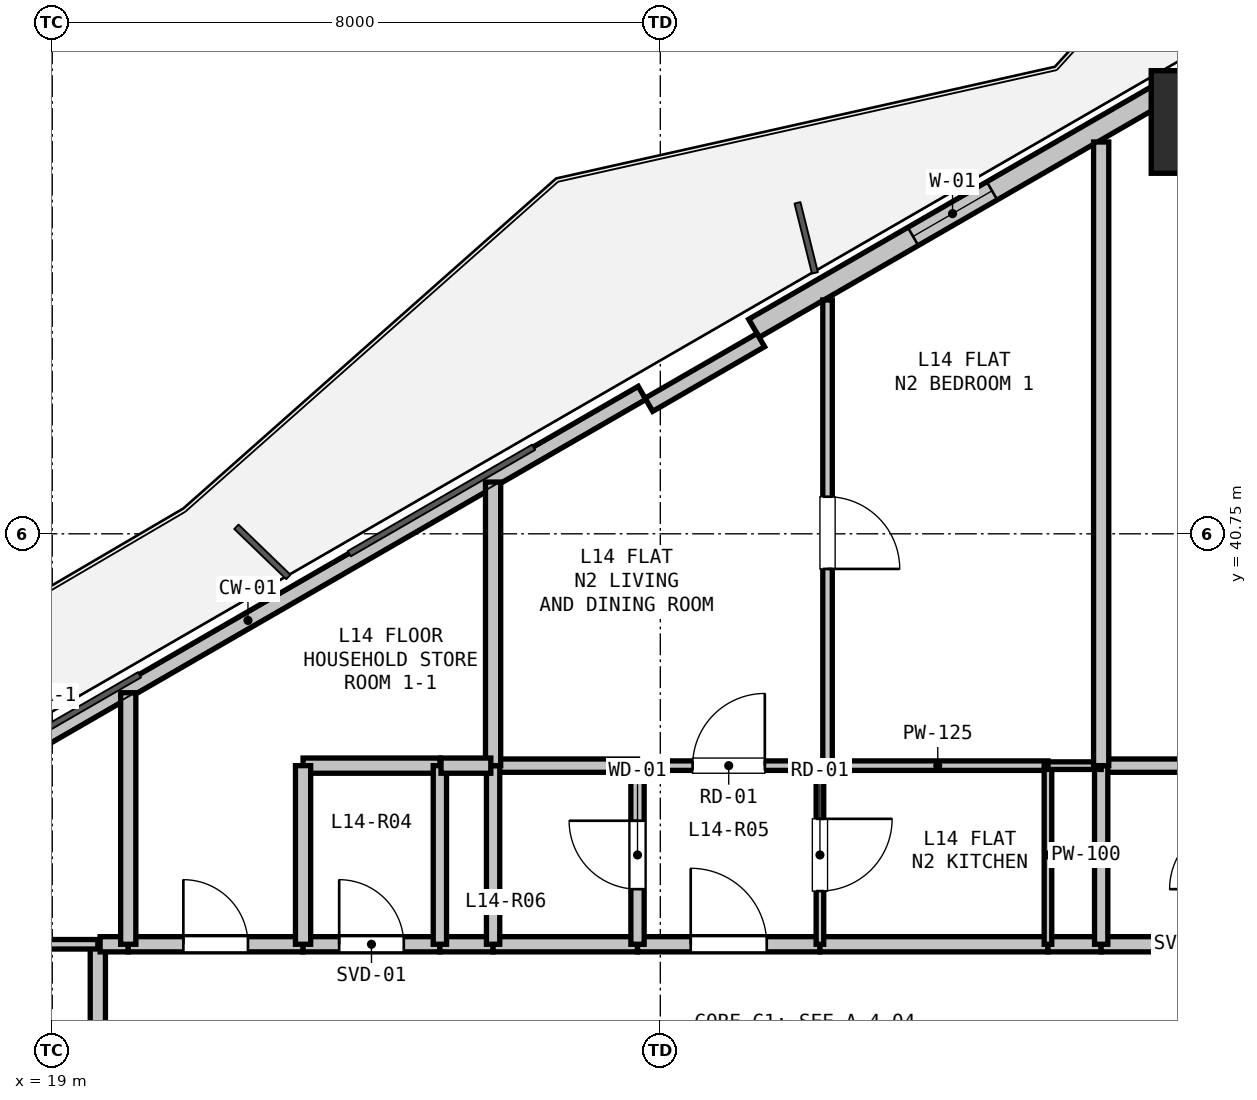
"""IFC4 building model, lengths in metres.
Left out: names, types, materials, properties, quantities, classifications, styles, units other than length and angle.
Written with IfcOpenShell. Run it as: python <this file> out.ifc"""

import sys

from ifc_helpers import new_model, si_unit, direction, frame, frame_2d, origin, origin_2d, place, context, subcontext, project, spatial, rectangle, hollow_rectangle, extrude, element, fill, save


model = new_model("IFC4")
c1 = context("Model", 3, precision=1e-05, world=origin(), true_north=direction((0.0, 1.0)))
c2 = subcontext(c1, "Body", "Model", "MODEL_VIEW")
j1 = project(units=[si_unit("LENGTHUNIT", "METRE"), si_unit("PLANEANGLEUNIT", "RADIAN")], contexts=[c1])
p1 = place(None, origin())
s1 = spatial("IfcSite", under=j1, at=p1, CompositionType="ELEMENT")
p2 = place(p1, origin())
s2 = spatial("IfcBuilding", under=s1, at=p2, CompositionType="ELEMENT")
p3 = place(p2, frame((0.0, 0.0, 52.2)))
s3 = spatial("IfcBuildingStorey", under=s2, at=p3, CompositionType="ELEMENT", Elevation=52.2)
p4 = place(p3, frame((34.133, 46.168, 0.0), z_axis=(0.0, 0.0, 1.0), x_axis=(1.0, 0.0, 0.0)))
e1 = element("IfcColumn", 1, at=p4, inside=s3, PredefinedType="COLUMN", context=c2, shape_type="SweptSolid", body=[
    extrude(hollow_rectangle(XDim=1.35, YDim=1.35, WallThickness=0.036, at=origin_2d()), origin(), (0.0, 0.0, 1.0), 3.3),
])
p5 = place(p3, frame((16.39, 36.617, 0.0), z_axis=(0.0, 0.0, 1.0), x_axis=(0.866027351828, 0.499996625875, 0.0)))
e2 = element("IfcWall", 2, at=p5, inside=s3, PredefinedType="PARAPET", context=c2, shape_type="SweptSolid", body=[
    extrude(rectangle(XDim=11.973, YDim=0.2, at=frame_2d((5.987, 0.0))), origin(), (0.0, 0.0, 1.0), 0.2),
])
p6 = place(p3, frame((28.232, 43.454, 0.0), z_axis=(0.0, 0.0, 1.0), x_axis=(0.86603192154, 0.499988710747, 0.0)))
e3 = element("IfcWall", 3, at=p6, inside=s3, PredefinedType="SOLIDWALL", context=c2, shape_type="SweptSolid", body=[
    extrude(rectangle(XDim=12.673, YDim=0.275, at=frame_2d((6.336, 0.0))), origin(), (0.0, 0.0, 1.0), 2.66),
])
p7 = place(p6, frame((2.417, 0.0, 0.9)))
e4 = element("IfcOpeningElement", 4, at=p7, cuts=e3, PredefinedType="OPENING", context=c2, shape_type="SweptSolid", body=[
    extrude(rectangle(XDim=1.2, YDim=1.4, at=frame_2d((0.6, 0.7))), frame((0.0, 0.147, 0.0), z_axis=(0.0, -1.0, 0.0), x_axis=(1.0, 0.0, 0.0)), (0.0, 0.0, 1.0), 0.295),
])
p8 = place(p6, frame((8.251, 0.0, 0.9)))
e5 = element("IfcOpeningElement", 5, at=p8, cuts=e3, PredefinedType="OPENING", context=c2, shape_type="SweptSolid", body=[
    extrude(rectangle(XDim=1.2, YDim=1.4, at=frame_2d((0.6, 0.7))), frame((0.0, 0.147, 0.0), z_axis=(0.0, -1.0, 0.0), x_axis=(1.0, 0.0, 0.0)), (0.0, 0.0, 1.0), 0.295),
])
p9 = place(p3, frame((26.85, 42.448, 0.0), z_axis=(0.0, 0.0, 1.0), x_axis=(0.86605165483, 0.499954529098, 0.0)))
e6 = element("IfcWall", 6, at=p9, inside=s3, PredefinedType="PARAPET", context=c2, shape_type="SweptSolid", body=[
    extrude(rectangle(XDim=1.7, YDim=0.2, at=frame_2d((0.85, 0.0))), origin(), (0.0, 0.0, 1.0), 2.66),
])
p10 = place(p3, frame((19.6, 31.1, 0.0), z_axis=(0.0, 0.0, 1.0), x_axis=(0.0, 1.0, 0.0)))
e7 = element("IfcWall", 7, at=p10, inside=s3, PredefinedType="PARTITIONING", context=c2, shape_type="SweptSolid", body=[
    extrude(rectangle(XDim=4.25, YDim=0.2, at=frame_2d((2.125, 0.0))), origin(), (0.0, 0.0, 1.0), 2.338),
])
p11 = place(p3, frame((19.63, 35.35, 0.0), z_axis=(0.0, 0.0, 1.0), x_axis=(1.0, 0.0, 0.0)))
e8 = element("IfcWall", 8, at=p11, inside=s3, PredefinedType="PARTITIONING", context=c2, shape_type="SweptSolid", body=[
    extrude(rectangle(XDim=0.37, YDim=0.2, at=frame_2d((0.185, 0.0))), origin(), (0.0, 0.0, 1.0), 3.04),
])
p12 = place(p3, frame((20.0, 35.35, 0.0), z_axis=(0.0, 0.0, 1.0), x_axis=(1.0, 0.0, 0.0)))
e9 = element("IfcWall", 9, at=p12, inside=s3, PredefinedType="PARTITIONING", context=c2, shape_type="SweptSolid", body=[
    extrude(rectangle(XDim=2.3, YDim=0.2, at=frame_2d((1.15, 0.0))), origin(), (0.0, 0.0, 1.0), 3.04),
])
p13 = place(p12, frame((0.725, 0.0, 0.0)))
e10 = element("IfcOpeningElement", 10, at=p13, cuts=e9, PredefinedType="OPENING", context=c2, shape_type="SweptSolid", body=[
    extrude(rectangle(XDim=0.85, YDim=2.1, at=frame_2d((0.425, 1.05))), frame((0.0, 0.11, 0.0), z_axis=(0.0, -1.0, 0.0), x_axis=(1.0, 0.0, 0.0)), (0.0, 0.0, 1.0), 0.22),
])
p14 = place(p3, frame((22.3, 35.35, 0.0), z_axis=(0.0, 0.0, 1.0), x_axis=(1.0, 0.0, 0.0)))
e11 = element("IfcWall", 11, at=p14, inside=s3, PredefinedType="PARTITIONING", context=c2, shape_type="SweptSolid", body=[
    extrude(rectangle(XDim=1.8, YDim=0.2, at=frame_2d((0.9, 0.0))), origin(), (0.0, 0.0, 1.0), 3.04),
])
p15 = place(p14, frame((0.475, 0.0, 0.0)))
e12 = element("IfcOpeningElement", 12, at=p15, cuts=e11, PredefinedType="OPENING", context=c2, shape_type="SweptSolid", body=[
    extrude(rectangle(XDim=0.85, YDim=2.1, at=frame_2d((0.425, 1.05))), frame((0.0, 0.11, 0.0), z_axis=(0.0, -1.0, 0.0), x_axis=(1.0, 0.0, 0.0)), (0.0, 0.0, 1.0), 0.22),
])
p16 = place(p3, frame((24.1, 35.35, 0.0), z_axis=(0.0, 0.0, 1.0), x_axis=(1.0, 0.0, 0.0)))
e13 = element("IfcWall", 13, at=p16, inside=s3, PredefinedType="PARTITIONING", context=c2, shape_type="SweptSolid", body=[
    extrude(rectangle(XDim=0.7, YDim=0.2, at=frame_2d((0.35, 0.0))), origin(), (0.0, 0.0, 1.0), 3.04),
])
p17 = place(p3, frame((24.8, 35.35, 0.0), z_axis=(0.0, 0.0, 1.0), x_axis=(1.0, 0.0, 0.0)))
e14 = element("IfcWall", 14, at=p17, inside=s3, PredefinedType="PARTITIONING", context=c2, shape_type="SweptSolid", body=[
    extrude(rectangle(XDim=1.9, YDim=0.2, at=frame_2d((0.95, 0.0))), origin(), (0.0, 0.0, 1.0), 3.04),
])
p18 = place(p3, frame((26.7, 35.35, 0.0), z_axis=(0.0, 0.0, 1.0), x_axis=(1.0, 0.0, 0.0)))
e15 = element("IfcWall", 15, at=p18, inside=s3, PredefinedType="PARTITIONING", context=c2, shape_type="SweptSolid", body=[
    extrude(rectangle(XDim=2.4, YDim=0.2, at=frame_2d((1.2, 0.0))), origin(), (0.0, 0.0, 1.0), 3.04),
])
p19 = place(p18, frame((0.7, 0.0, 0.0)))
e16 = element("IfcOpeningElement", 16, at=p19, cuts=e15, PredefinedType="OPENING", context=c2, shape_type="SweptSolid", body=[
    extrude(rectangle(XDim=1.0, YDim=2.15, at=frame_2d((0.5, 1.075))), frame((0.0, 0.11, 0.0), z_axis=(0.0, -1.0, 0.0), x_axis=(1.0, 0.0, 0.0)), (0.0, 0.0, 1.0), 0.22),
])
p20 = place(p3, frame((29.1, 35.35, 0.0), z_axis=(0.0, 0.0, 1.0), x_axis=(1.0, 0.0, 0.0)))
e17 = element("IfcWall", 17, at=p20, inside=s3, PredefinedType="PARTITIONING", context=c2, shape_type="SweptSolid", body=[
    extrude(rectangle(XDim=3.0, YDim=0.2, at=frame_2d((1.5, 0.0))), origin(), (0.0, 0.0, 1.0), 3.04),
])
p21 = place(p3, frame((32.1, 35.35, 0.0), z_axis=(0.0, 0.0, 1.0), x_axis=(1.0, 0.0, 0.0)))
e18 = element("IfcWall", 18, at=p21, inside=s3, PredefinedType="PARTITIONING", context=c2, shape_type="SweptSolid", body=[
    extrude(rectangle(XDim=0.7, YDim=0.2, at=frame_2d((0.35, 0.0))), origin(), (0.0, 0.0, 1.0), 3.04),
])
p22 = place(p3, frame((32.8, 35.35, 0.0), z_axis=(0.0, 0.0, 1.0), x_axis=(1.0, 0.0, 0.0)))
e19 = element("IfcWall", 19, at=p22, inside=s3, PredefinedType="PARTITIONING", context=c2, shape_type="SweptSolid", body=[
    extrude(rectangle(XDim=1.8, YDim=0.2, at=frame_2d((0.9, 0.0))), origin(), (0.0, 0.0, 1.0), 3.04),
])
p23 = place(p3, frame((26.7, 37.7, 0.0), z_axis=(0.0, 0.0, 1.0), x_axis=(1.0, 0.0, 0.0)))
e20 = element("IfcWall", 20, at=p23, inside=s3, PredefinedType="PARTITIONING", context=c2, shape_type="SweptSolid", body=[
    extrude(rectangle(XDim=2.4, YDim=0.125, at=frame_2d((1.2, 0.0))), origin(), (0.0, 0.0, 1.0), 3.04),
])
p24 = place(p23, frame((0.725, 0.0, 0.0)))
e21 = element("IfcOpeningElement", 21, at=p24, cuts=e20, PredefinedType="OPENING", context=c2, shape_type="SweptSolid", body=[
    extrude(rectangle(XDim=0.95, YDim=2.1, at=frame_2d((0.475, 1.05))), frame((0.0, 0.073, 0.0), z_axis=(0.0, -1.0, 0.0), x_axis=(1.0, 0.0, 0.0)), (0.0, 0.0, 1.0), 0.145),
])
p25 = place(p3, frame((29.1, 37.7, 0.0), z_axis=(0.0, 0.0, 1.0), x_axis=(0.0, -1.0, 0.0)))
e22 = element("IfcWall", 22, at=p25, inside=s3, PredefinedType="PARTITIONING", context=c2, shape_type="SweptSolid", body=[
    extrude(rectangle(XDim=2.35, YDim=0.1, at=frame_2d((1.175, 0.0))), origin(), (0.0, 0.0, 1.0), 3.04),
])
p26 = place(p25, frame((0.7, 0.0, 0.0)))
e23 = element("IfcOpeningElement", 23, at=p26, cuts=e22, PredefinedType="OPENING", context=c2, shape_type="SweptSolid", body=[
    extrude(rectangle(XDim=0.95, YDim=2.1, at=frame_2d((0.475, 1.05))), frame((0.0, 0.06, 0.0), z_axis=(0.0, -1.0, 0.0), x_axis=(1.0, 0.0, 0.0)), (0.0, 0.0, 1.0), 0.12),
])
p27 = place(p3, frame((26.7, 35.35, 0.0), z_axis=(0.0, 0.0, 1.0), x_axis=(0.0, 1.0, 0.0)))
e24 = element("IfcWall", 24, at=p27, inside=s3, PredefinedType="PLUMBINGWALL", context=c2, shape_type="SweptSolid", body=[
    extrude(rectangle(XDim=2.35, YDim=0.175, at=frame_2d((1.175, 0.0))), origin(), (0.0, 0.0, 1.0), 3.04),
])
p28 = place(p27, frame((0.725, 0.0, 0.0)))
e25 = element("IfcOpeningElement", 25, at=p28, cuts=e24, PredefinedType="OPENING", context=c2, shape_type="SweptSolid", body=[
    extrude(rectangle(XDim=0.9, YDim=2.1, at=frame_2d((0.45, 1.05))), frame((0.0, 0.097, 0.0), z_axis=(0.0, -1.0, 0.0), x_axis=(1.0, 0.0, 0.0)), (0.0, 0.0, 1.0), 0.195),
])
p29 = place(p3, frame((22.3, 37.7, 0.0), z_axis=(0.0, 0.0, 1.0), x_axis=(1.0, 0.0, 0.0)))
e26 = element("IfcWall", 26, at=p29, inside=s3, PredefinedType="PARTITIONING", context=c2, shape_type="SweptSolid", body=[
    extrude(rectangle(XDim=1.8, YDim=0.2, at=frame_2d((0.9, 0.0))), origin(), (0.0, 0.0, 1.0), 3.04),
])
p30 = place(p3, frame((24.1, 37.7, 0.0), z_axis=(0.0, 0.0, 1.0), x_axis=(0.0, -1.0, 0.0)))
e27 = element("IfcWall", 27, at=p30, inside=s3, PredefinedType="PLUMBINGWALL", context=c2, shape_type="SweptSolid", body=[
    extrude(rectangle(XDim=2.35, YDim=0.175, at=frame_2d((1.175, 0.0))), origin(), (0.0, 0.0, 1.0), 3.04),
])
p31 = place(p3, frame((22.3, 35.35, 0.0), z_axis=(0.0, 0.0, 1.0), x_axis=(0.0, 1.0, 0.0)))
e28 = element("IfcWall", 28, at=p31, inside=s3, PredefinedType="PARTITIONING", context=c2, shape_type="SweptSolid", body=[
    extrude(rectangle(XDim=2.35, YDim=0.2, at=frame_2d((1.175, 0.0))), origin(), (0.0, 0.0, 1.0), 3.04),
])
p32 = place(p3, frame((24.8, 37.7, 0.0), z_axis=(0.0, 0.0, 1.0), x_axis=(1.0, 0.0, 0.0)))
e29 = element("IfcWall", 29, at=p32, inside=s3, PredefinedType="PLUMBINGWALL", context=c2, shape_type="SweptSolid", body=[
    extrude(rectangle(XDim=1.9, YDim=0.175, at=frame_2d((0.95, 0.0))), origin(), (0.0, 0.0, 1.0), 3.04),
])
p33 = place(p3, frame((24.8, 35.35, 0.0), z_axis=(0.0, 0.0, 1.0), x_axis=(0.0, 1.0, 0.0)))
e30 = element("IfcWall", 30, at=p33, inside=s3, PredefinedType="PLUMBINGWALL", context=c2, shape_type="SweptSolid", body=[
    extrude(rectangle(XDim=2.35, YDim=0.175, at=frame_2d((1.175, 0.0))), origin(), (0.0, 0.0, 1.0), 3.04),
])
p34 = place(p3, frame((29.2, 37.7, 0.0), z_axis=(0.0, 0.0, 1.0), x_axis=(1.0, 0.0, 0.0)))
e31 = element("IfcWall", 31, at=p34, inside=s3, PredefinedType="PARTITIONING", context=c2, shape_type="SweptSolid", body=[
    extrude(rectangle(XDim=2.9, YDim=0.125, at=frame_2d((1.45, 0.0))), origin(), (0.0, 0.0, 1.0), 3.04),
])
p35 = place(p3, frame((32.1, 37.7, 0.0), z_axis=(0.0, 0.0, 1.0), x_axis=(0.0, -1.0, 0.0)))
e32 = element("IfcWall", 32, at=p35, inside=s3, PredefinedType="PARTITIONING", context=c2, shape_type="SweptSolid", body=[
    extrude(rectangle(XDim=2.35, YDim=0.1, at=frame_2d((1.175, 0.0))), origin(), (0.0, 0.0, 1.0), 3.04),
])
p36 = place(p3, frame((32.8, 37.7, 0.0), z_axis=(0.0, 0.0, 1.0), x_axis=(1.0, 0.0, 0.0)))
e33 = element("IfcWall", 33, at=p36, inside=s3, PredefinedType="PLUMBINGWALL", context=c2, shape_type="SweptSolid", body=[
    extrude(rectangle(XDim=1.8, YDim=0.175, at=frame_2d((0.9, 0.0))), origin(), (0.0, 0.0, 1.0), 3.04),
])
p37 = place(p3, frame((32.8, 35.35, 0.0), z_axis=(0.0, 0.0, 1.0), x_axis=(0.0, 1.0, 0.0)))
e34 = element("IfcWall", 34, at=p37, inside=s3, PredefinedType="PLUMBINGWALL", context=c2, shape_type="SweptSolid", body=[
    extrude(rectangle(XDim=2.35, YDim=0.175, at=frame_2d((1.175, 0.0))), origin(), (0.0, 0.0, 1.0), 3.04),
])
p38 = place(p3, frame((17.15, 35.35, 0.0), z_axis=(0.0, 0.0, 1.0), x_axis=(1.0, 0.0, 0.0)))
e35 = element("IfcWall", 35, at=p38, inside=s3, PredefinedType="PARTITIONING", context=c2, shape_type="SweptSolid", body=[
    extrude(rectangle(XDim=2.45, YDim=0.125, at=frame_2d((1.225, 0.0))), origin(), (0.0, 0.0, 1.0), 3.04),
])
p39 = place(p3, frame((24.8, 41.431, 0.0), z_axis=(0.0, 0.0, 1.0), x_axis=(0.0, -1.0, 0.0)))
e36 = element("IfcWall", 36, at=p39, inside=s3, PredefinedType="PARTITIONING", context=c2, shape_type="SweptSolid", body=[
    extrude(rectangle(XDim=3.731, YDim=0.2, at=frame_2d((1.865, 0.0))), origin(), (0.0, 0.0, 1.0), 2.365),
])
p40 = place(p3, frame((24.77, 37.7, 0.0), z_axis=(0.0, 0.0, 1.0), x_axis=(-1.0, 0.0, 0.0)))
e37 = element("IfcWall", 37, at=p40, inside=s3, PredefinedType="PARTITIONING", context=c2, shape_type="SweptSolid", body=[
    extrude(rectangle(XDim=0.655, YDim=0.2, at=frame_2d((0.328, 0.0))), origin(), (0.0, 0.0, 1.0), 3.04),
])
p41 = place(p3, frame((20.0, 35.35, 0.0), z_axis=(0.0, 0.0, 1.0), x_axis=(0.0, 1.0, 0.0)))
e38 = element("IfcWall", 38, at=p41, inside=s3, PredefinedType="PARTITIONING", context=c2, shape_type="SweptSolid", body=[
    extrude(rectangle(XDim=3.31, YDim=0.2, at=frame_2d((1.655, 0.0))), origin(), (0.0, 0.0, 1.0), 2.365),
])
p42 = place(p3, frame((29.2, 43.826, 0.0), z_axis=(0.0, 0.0, 1.0), x_axis=(0.0, -1.0, 0.0)))
e39 = element("IfcWall", 39, at=p42, inside=s3, PredefinedType="PARTITIONING", context=c2, shape_type="SweptSolid", body=[
    extrude(rectangle(XDim=6.126, YDim=0.125, at=frame_2d((3.063, 0.0))), origin(), (0.0, 0.0, 1.0), 2.365),
])
p43 = place(p42, frame((2.588, 0.0, 0.0)))
e40 = element("IfcOpeningElement", 40, at=p43, cuts=e39, PredefinedType="OPENING", context=c2, shape_type="SweptSolid", body=[
    extrude(rectangle(XDim=0.95, YDim=2.1, at=frame_2d((0.475, 1.05))), frame((0.0, 0.073, 0.0), z_axis=(0.0, -1.0, 0.0), x_axis=(1.0, 0.0, 0.0)), (0.0, 0.0, 1.0), 0.145),
])
p44 = place(p3, frame((32.8, 37.7, 0.0), z_axis=(0.0, 0.0, 1.0), x_axis=(-1.0, 0.0, 0.0)))
e41 = element("IfcWall", 41, at=p44, inside=s3, PredefinedType="PARTITIONING", context=c2, shape_type="SweptSolid", body=[
    extrude(rectangle(XDim=0.7, YDim=0.1, at=frame_2d((0.35, 0.0))), origin(), (0.0, 0.0, 1.0), 3.04),
])
p45 = place(p3, frame((32.8, 45.905, 0.0), z_axis=(0.0, 0.0, 1.0), x_axis=(0.0, -1.0, 0.0)))
e42 = element("IfcWall", 42, at=p45, inside=s3, PredefinedType="PARTITIONING", context=c2, shape_type="SweptSolid", body=[
    extrude(rectangle(XDim=8.205, YDim=0.2, at=frame_2d((4.103, 0.0))), origin(), (0.0, 0.0, 1.0), 2.365),
])
p46 = place(p7, origin())
e43 = element("IfcWindow", 43, at=p46, inside=s3, PartitioningType="SINGLE_PANEL", PredefinedType="WINDOW", context=c2, shape_type="SweptSolid", body=[
    extrude(rectangle(XDim=1.2, YDim=1.4, at=frame_2d((0.6, 0.7))), frame((0.0, 0.03, 0.0), z_axis=(0.0, -1.0, 0.0), x_axis=(1.0, 0.0, 0.0)), (0.0, 0.0, 1.0), 0.06),
])
fill(e4, e43)
p47 = place(p19, origin())
e44 = element("IfcDoor", 44, at=p47, inside=s3, OperationType="SINGLE_SWING_LEFT", PredefinedType="DOOR", context=c2, shape_type="SweptSolid", body=[
    extrude(rectangle(XDim=1.0, YDim=2.15, at=frame_2d((0.5, 1.075))), frame((0.0, 0.025, 0.0), z_axis=(0.0, -1.0, 0.0), x_axis=(1.0, 0.0, 0.0)), (0.0, 0.0, 1.0), 0.05),
])
fill(e16, e44)
p48 = place(p15, origin())
e45 = element("IfcDoor", 45, at=p48, inside=s3, OperationType="SINGLE_SWING_LEFT", PredefinedType="DOOR", context=c2, shape_type="SweptSolid", body=[
    extrude(rectangle(XDim=0.85, YDim=2.1, at=frame_2d((0.425, 1.05))), frame((0.0, 0.025, 0.0), z_axis=(0.0, -1.0, 0.0), x_axis=(1.0, 0.0, 0.0)), (0.0, 0.0, 1.0), 0.05),
])
fill(e12, e45)
p49 = place(p13, origin())
e46 = element("IfcDoor", 46, at=p49, inside=s3, OperationType="SINGLE_SWING_LEFT", PredefinedType="DOOR", context=c2, shape_type="SweptSolid", body=[
    extrude(rectangle(XDim=0.85, YDim=2.1, at=frame_2d((0.425, 1.05))), frame((0.0, 0.025, 0.0), z_axis=(0.0, -1.0, 0.0), x_axis=(1.0, 0.0, 0.0)), (0.0, 0.0, 1.0), 0.05),
])
fill(e10, e46)
p50 = place(p28, origin())
e47 = element("IfcDoor", 47, at=p50, inside=s3, OperationType="SINGLE_SWING_RIGHT", PredefinedType="DOOR", context=c2, shape_type="SweptSolid", body=[
    extrude(rectangle(XDim=0.9, YDim=2.1, at=frame_2d((0.45, 1.05))), frame((0.0, 0.025, 0.0), z_axis=(0.0, -1.0, 0.0), x_axis=(1.0, 0.0, 0.0)), (0.0, 0.0, 1.0), 0.05),
])
fill(e25, e47)
p51 = place(p26, origin())
e48 = element("IfcDoor", 48, at=p51, inside=s3, OperationType="SINGLE_SWING_LEFT", PredefinedType="DOOR", context=c2, shape_type="SweptSolid", body=[
    extrude(rectangle(XDim=0.95, YDim=2.1, at=frame_2d((0.475, 1.05))), frame((0.0, 0.025, 0.0), z_axis=(0.0, -1.0, 0.0), x_axis=(1.0, 0.0, 0.0)), (0.0, 0.0, 1.0), 0.05),
])
fill(e23, e48)
p52 = place(p24, origin())
e49 = element("IfcDoor", 49, at=p52, inside=s3, OperationType="SINGLE_SWING_RIGHT", PredefinedType="DOOR", context=c2, shape_type="SweptSolid", body=[
    extrude(rectangle(XDim=0.95, YDim=2.1, at=frame_2d((0.475, 1.05))), frame((0.0, 0.025, 0.0), z_axis=(0.0, -1.0, 0.0), x_axis=(1.0, 0.0, 0.0)), (0.0, 0.0, 1.0), 0.05),
])
fill(e21, e49)
p53 = place(p43, origin())
e50 = element("IfcDoor", 50, at=p53, inside=s3, OperationType="SINGLE_SWING_RIGHT", PredefinedType="DOOR", context=c2, shape_type="SweptSolid", body=[
    extrude(rectangle(XDim=0.95, YDim=2.1, at=frame_2d((0.475, 1.05))), frame((0.0, 0.025, 0.0), z_axis=(0.0, -1.0, 0.0), x_axis=(1.0, 0.0, 0.0)), (0.0, 0.0, 1.0), 0.05),
])
fill(e40, e50)
save(model, sys.argv[1])
